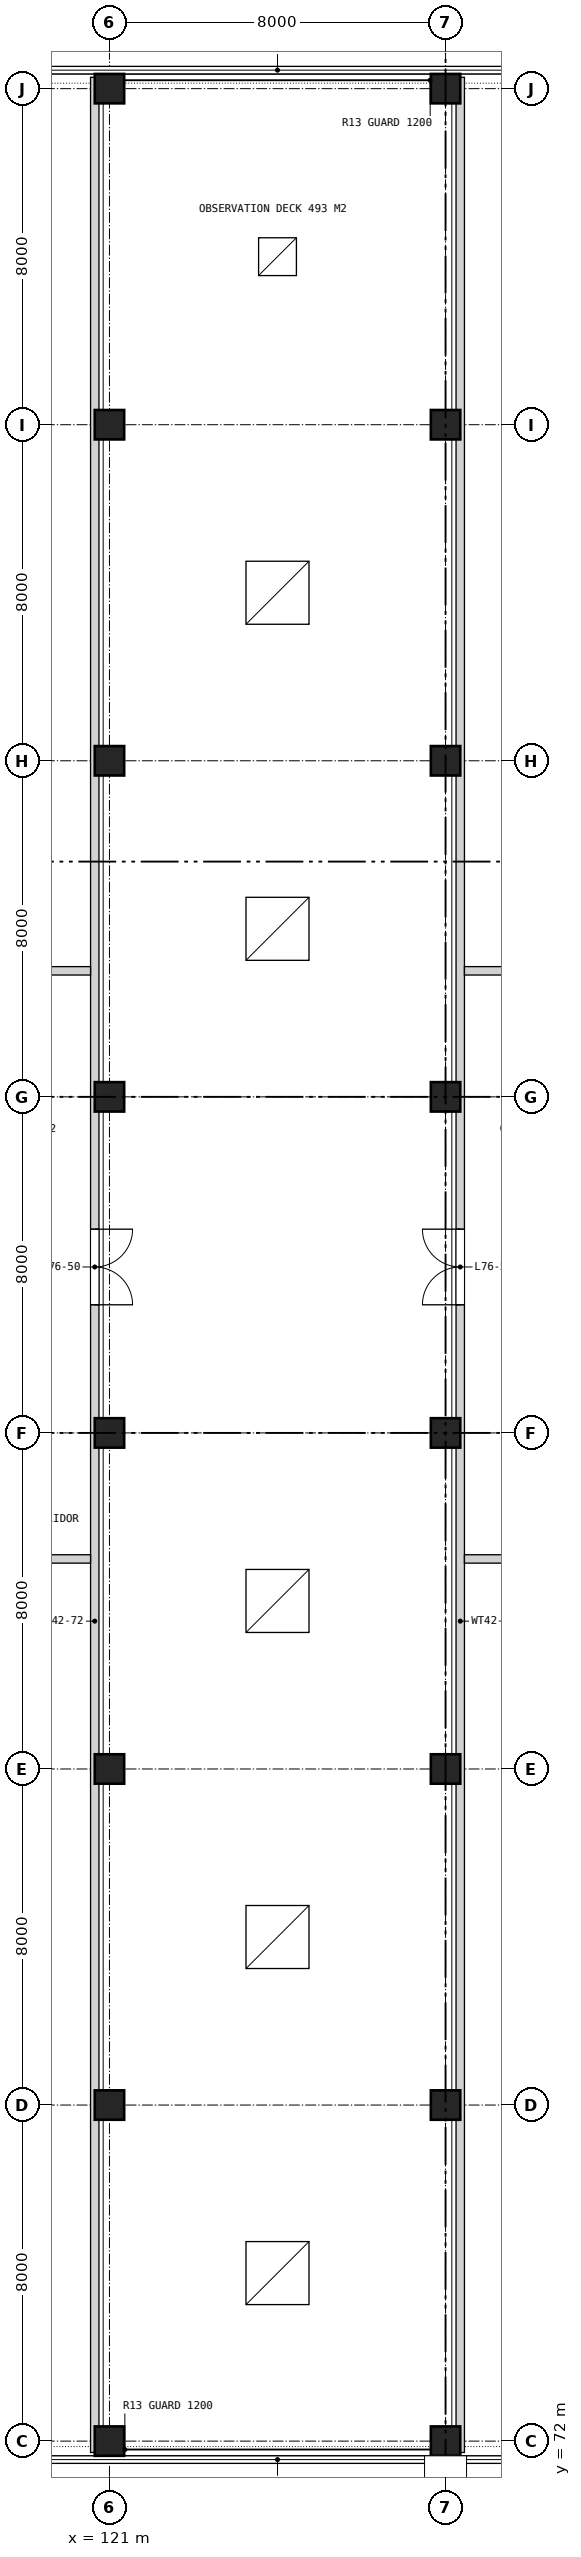
"""IFC4 building model, lengths in metres.
Left out: names, types, materials, properties, quantities, classifications, styles, units other than length and angle.
Written with IfcOpenShell. Run it as: python <this file> out.ifc"""

import sys

from ifc_helpers import new_model, si_unit, direction, frame, frame_2d, origin, origin_2d, place, context, subcontext, project, spatial, rectangle, extrude, element, fill, save


model = new_model("IFC4")
c1 = context("Model", 3, precision=1e-05, world=origin(), true_north=direction((0.0, 1.0)))
c2 = subcontext(c1, "Body", "Model", "MODEL_VIEW")
j1 = project(units=[si_unit("LENGTHUNIT", "METRE"), si_unit("PLANEANGLEUNIT", "RADIAN")], contexts=[c1])
p1 = place(None, origin())
s1 = spatial("IfcSite", under=j1, at=p1, CompositionType="ELEMENT")
p2 = place(p1, origin())
s2 = spatial("IfcBuilding", under=s1, at=p2, CompositionType="ELEMENT")
p3 = place(p2, frame((0.0, 0.0, 349.1)))
s3 = spatial("IfcBuildingStorey", under=s2, at=p3, CompositionType="ELEMENT", Elevation=349.1)
for number, where, z_axis, x_axis in (
    (1, (121.0, 72.0, 0.0), (0.0, 0.0, 1.0), (1.0, 0.0, 0.0)),
    (2, (121.0, 80.0, 0.0), (0.0, 0.0, 1.0), (1.0, 0.0, 0.0)),
    (3, (121.0, 88.0, 0.0), (0.0, 0.0, 1.0), (1.0, 0.0, 0.0)),
    (4, (121.0, 96.0, 0.0), (0.0, 0.0, 1.0), (1.0, 0.0, 0.0)),
    (5, (121.0, 104.0, 0.0), (0.0, 0.0, 1.0), (1.0, 0.0, 0.0)),
    (6, (121.0, 112.0, 0.0), (0.0, 0.0, 1.0), (1.0, 0.0, 0.0)),
    (7, (121.0, 120.0, 0.0), (0.0, 0.0, 1.0), (1.0, 0.0, 0.0)),
    (8, (121.0, 128.0, 0.0), (0.0, 0.0, 1.0), (1.0, 0.0, 0.0)),
    (9, (129.0, 72.0, 0.0), (0.0, 0.0, 1.0), (1.0, 0.0, 0.0)),
    (10, (129.0, 80.0, 0.0), (0.0, 0.0, 1.0), (1.0, 0.0, 0.0)),
    (11, (129.0, 88.0, 0.0), (0.0, 0.0, 1.0), (1.0, 0.0, 0.0)),
    (12, (129.0, 96.0, 0.0), (0.0, 0.0, 1.0), (1.0, 0.0, 0.0)),
    (13, (129.0, 104.0, 0.0), (0.0, 0.0, 1.0), (1.0, 0.0, 0.0)),
    (14, (129.0, 112.0, 0.0), (0.0, 0.0, 1.0), (1.0, 0.0, 0.0)),
    (15, (129.0, 120.0, 0.0), (0.0, 0.0, 1.0), (1.0, 0.0, 0.0)),
    (16, (129.0, 128.0, 0.0), (0.0, 0.0, 1.0), (1.0, 0.0, 0.0)),
):
    element("IfcColumn", number, at=place(p3, frame(where, z_axis=z_axis, x_axis=x_axis)), inside=s3, PredefinedType="COLUMN", context=c2, shape_type="SweptSolid", body=[
        extrude(rectangle(XDim=0.7, YDim=0.7, at=origin_2d()), origin(), (0.0, 0.0, 1.0), 10.23),
    ])
p4 = place(p3, frame((120.65, 71.73, 0.0), z_axis=(0.0, 0.0, 1.0), x_axis=(0.0, 1.0, 0.0)))
e17 = element("IfcWall", 17, at=p4, inside=s3, PredefinedType="SOLIDWALL", context=c2, shape_type="SweptSolid", body=[
    extrude(rectangle(XDim=56.54, YDim=0.2, at=frame_2d((28.27, 0.0))), origin(), (0.0, 0.0, 1.0), 11.6),
])
p5 = place(p4, frame((27.32, 0.0, 0.0)))
e18 = element("IfcOpeningElement", 18, at=p5, cuts=e17, PredefinedType="OPENING", context=c2, shape_type="SweptSolid", body=[
    extrude(rectangle(XDim=1.8, YDim=2.1, at=frame_2d((0.9, 1.05))), frame((0.0, 0.11, 0.0), z_axis=(0.0, -1.0, 0.0), x_axis=(1.0, 0.0, 0.0)), (0.0, 0.0, 1.0), 0.22),
])
p6 = place(p3, frame((129.35, 71.73, 0.0), z_axis=(0.0, 0.0, 1.0), x_axis=(0.0, 1.0, 0.0)))
e19 = element("IfcWall", 19, at=p6, inside=s3, PredefinedType="SOLIDWALL", context=c2, shape_type="SweptSolid", body=[
    extrude(rectangle(XDim=56.54, YDim=0.2, at=frame_2d((28.27, 0.0))), origin(), (0.0, 0.0, 1.0), 11.6),
])
p7 = place(p6, frame((27.32, 0.0, 0.0)))
e20 = element("IfcOpeningElement", 20, at=p7, cuts=e19, PredefinedType="OPENING", context=c2, shape_type="SweptSolid", body=[
    extrude(rectangle(XDim=1.8, YDim=2.1, at=frame_2d((0.9, 1.05))), frame((0.0, 0.11, 0.0), z_axis=(0.0, -1.0, 0.0), x_axis=(1.0, 0.0, 0.0)), (0.0, 0.0, 1.0), 0.22),
])
p8 = place(p3, frame((113.0, 93.0, 0.0), z_axis=(0.0, 0.0, 1.0), x_axis=(1.0, 0.0, 0.0)))
e21 = element("IfcWall", 21, at=p8, inside=s3, PredefinedType="SOLIDWALL", context=c2, shape_type="SweptSolid", body=[
    extrude(rectangle(XDim=7.55, YDim=0.2, at=frame_2d((3.775, 0.0))), origin(), (0.0, 0.0, 1.0), 11.6),
])
p9 = place(p8, frame((3.25, 0.0, 0.0)))
e22 = element("IfcOpeningElement", 22, at=p9, cuts=e21, PredefinedType="OPENING", context=c2, shape_type="SweptSolid", body=[
    extrude(rectangle(XDim=1.0, YDim=2.1, at=frame_2d((0.5, 1.05))), frame((0.0, 0.11, 0.0), z_axis=(0.0, -1.0, 0.0), x_axis=(1.0, 0.0, 0.0)), (0.0, 0.0, 1.0), 0.22),
])
p10 = place(p3, frame((129.45, 93.0, 0.0), z_axis=(0.0, 0.0, 1.0), x_axis=(1.0, 0.0, 0.0)))
e23 = element("IfcWall", 23, at=p10, inside=s3, PredefinedType="SOLIDWALL", context=c2, shape_type="SweptSolid", body=[
    extrude(rectangle(XDim=7.55, YDim=0.2, at=frame_2d((3.775, 0.0))), origin(), (0.0, 0.0, 1.0), 11.6),
])
p11 = place(p10, frame((3.25, 0.0, 0.0)))
e24 = element("IfcOpeningElement", 24, at=p11, cuts=e23, PredefinedType="OPENING", context=c2, shape_type="SweptSolid", body=[
    extrude(rectangle(XDim=1.0, YDim=2.1, at=frame_2d((0.5, 1.05))), frame((0.0, 0.11, 0.0), z_axis=(0.0, -1.0, 0.0), x_axis=(1.0, 0.0, 0.0)), (0.0, 0.0, 1.0), 0.22),
])
p12 = place(p3, frame((113.0, 107.0, 0.0), z_axis=(0.0, 0.0, 1.0), x_axis=(1.0, 0.0, 0.0)))
e25 = element("IfcWall", 25, at=p12, inside=s3, PredefinedType="SOLIDWALL", context=c2, shape_type="SweptSolid", body=[
    extrude(rectangle(XDim=7.55, YDim=0.2, at=frame_2d((3.775, 0.0))), origin(), (0.0, 0.0, 1.0), 11.6),
])
p13 = place(p12, frame((3.25, 0.0, 0.0)))
e26 = element("IfcOpeningElement", 26, at=p13, cuts=e25, PredefinedType="OPENING", context=c2, shape_type="SweptSolid", body=[
    extrude(rectangle(XDim=1.0, YDim=2.1, at=frame_2d((0.5, 1.05))), frame((0.0, 0.11, 0.0), z_axis=(0.0, -1.0, 0.0), x_axis=(1.0, 0.0, 0.0)), (0.0, 0.0, 1.0), 0.22),
])
p14 = place(p3, frame((129.45, 107.0, 0.0), z_axis=(0.0, 0.0, 1.0), x_axis=(1.0, 0.0, 0.0)))
e27 = element("IfcWall", 27, at=p14, inside=s3, PredefinedType="SOLIDWALL", context=c2, shape_type="SweptSolid", body=[
    extrude(rectangle(XDim=7.55, YDim=0.2, at=frame_2d((3.775, 0.0))), origin(), (0.0, 0.0, 1.0), 11.6),
])
p15 = place(p14, frame((3.25, 0.0, 0.0)))
e28 = element("IfcOpeningElement", 28, at=p15, cuts=e27, PredefinedType="OPENING", context=c2, shape_type="SweptSolid", body=[
    extrude(rectangle(XDim=1.0, YDim=2.1, at=frame_2d((0.5, 1.05))), frame((0.0, 0.11, 0.0), z_axis=(0.0, -1.0, 0.0), x_axis=(1.0, 0.0, 0.0)), (0.0, 0.0, 1.0), 0.22),
])
p16 = place(p2, frame((0.0, 0.0, 361.0)))
p17 = place(p16, frame((0.0, 0.0, -0.2)))
p18 = place(p17, frame((125.0, 76.0, 0.0)))
p19 = place(p18, frame((0.0, 0.0, 0.25)))
e29 = element("IfcWindow", 29, at=p19, inside=s3, PartitioningType="SINGLE_PANEL", PredefinedType="SKYLIGHT", context=c2, shape_type="SweptSolid", body=[
    extrude(rectangle(XDim=1.5, YDim=1.5, at=origin_2d()), origin(), (0.0, 0.0, 1.0), 0.05),
])
p20 = place(p17, frame((125.0, 84.0, 0.0)))
p21 = place(p20, frame((0.0, 0.0, 0.25)))
e30 = element("IfcWindow", 30, at=p21, inside=s3, PartitioningType="SINGLE_PANEL", PredefinedType="SKYLIGHT", context=c2, shape_type="SweptSolid", body=[
    extrude(rectangle(XDim=1.5, YDim=1.5, at=origin_2d()), origin(), (0.0, 0.0, 1.0), 0.05),
])
p22 = place(p17, frame((125.0, 92.0, 0.0)))
p23 = place(p22, frame((0.0, 0.0, 0.25)))
e31 = element("IfcWindow", 31, at=p23, inside=s3, PartitioningType="SINGLE_PANEL", PredefinedType="SKYLIGHT", context=c2, shape_type="SweptSolid", body=[
    extrude(rectangle(XDim=1.5, YDim=1.5, at=origin_2d()), origin(), (0.0, 0.0, 1.0), 0.05),
])
p24 = place(p17, frame((125.0, 108.0, 0.0)))
p25 = place(p24, frame((0.0, 0.0, 0.25)))
e32 = element("IfcWindow", 32, at=p25, inside=s3, PartitioningType="SINGLE_PANEL", PredefinedType="SKYLIGHT", context=c2, shape_type="SweptSolid", body=[
    extrude(rectangle(XDim=1.5, YDim=1.5, at=origin_2d()), origin(), (0.0, 0.0, 1.0), 0.05),
])
p26 = place(p17, frame((125.0, 116.0, 0.0)))
p27 = place(p26, frame((0.0, 0.0, 0.25)))
e33 = element("IfcWindow", 33, at=p27, inside=s3, PartitioningType="SINGLE_PANEL", PredefinedType="SKYLIGHT", context=c2, shape_type="SweptSolid", body=[
    extrude(rectangle(XDim=1.5, YDim=1.5, at=origin_2d()), origin(), (0.0, 0.0, 1.0), 0.05),
])
p28 = place(p17, frame((125.0, 124.0, 0.0)))
p29 = place(p28, frame((0.0, 0.0, 0.25)))
e34 = element("IfcWindow", 34, at=p29, inside=s3, PartitioningType="SINGLE_PANEL", PredefinedType="SKYLIGHT", context=c2, shape_type="SweptSolid", body=[
    extrude(rectangle(XDim=0.9, YDim=0.9, at=origin_2d()), origin(), (0.0, 0.0, 1.0), 0.05),
])
p30 = place(p5, frame((1.8, 0.0, 0.0), z_axis=(0.0, 0.0, 1.0), x_axis=(-1.0, 0.0, 0.0)))
e35 = element("IfcDoor", 35, at=p30, inside=s3, OperationType="DOUBLE_DOOR_SINGLE_SWING", PredefinedType="DOOR", context=c2, shape_type="SweptSolid", body=[
    extrude(rectangle(XDim=1.8, YDim=2.1, at=frame_2d((0.9, 1.05))), frame((0.0, 0.025, 0.0), z_axis=(0.0, -1.0, 0.0), x_axis=(1.0, 0.0, 0.0)), (0.0, 0.0, 1.0), 0.05),
])
fill(e18, e35)
p31 = place(p7, origin())
e36 = element("IfcDoor", 36, at=p31, inside=s3, OperationType="DOUBLE_DOOR_SINGLE_SWING", PredefinedType="DOOR", context=c2, shape_type="SweptSolid", body=[
    extrude(rectangle(XDim=1.8, YDim=2.1, at=frame_2d((0.9, 1.05))), frame((0.0, 0.025, 0.0), z_axis=(0.0, -1.0, 0.0), x_axis=(1.0, 0.0, 0.0)), (0.0, 0.0, 1.0), 0.05),
])
fill(e20, e36)
save(model, sys.argv[1])
